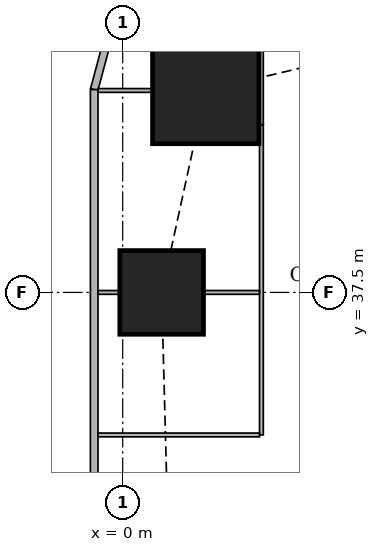
"""IFC4 building model, lengths in metres.
Left out: names, types, materials, properties, quantities, classifications, styles, units other than length and angle.
Written with IfcOpenShell. Run it as: python <this file> out.ifc"""

import sys

from ifc_helpers import new_model, si_unit, direction, frame, frame_2d, origin, origin_2d, place, context, subcontext, project, spatial, rectangle, extrude, element, fill, save


model = new_model("IFC4")
c1 = context("Model", 3, precision=1e-05, world=origin(), true_north=direction((0.0, 1.0)))
c2 = subcontext(c1, "Body", "Model", "MODEL_VIEW")
j1 = project(units=[si_unit("LENGTHUNIT", "METRE"), si_unit("PLANEANGLEUNIT", "RADIAN")], contexts=[c1])
p1 = place(None, origin())
s1 = spatial("IfcSite", under=j1, at=p1, CompositionType="ELEMENT")
p2 = place(p1, origin())
s2 = spatial("IfcBuilding", under=s1, at=p2, CompositionType="ELEMENT")
p3 = place(p2, frame((0.0, 0.0, 89.15)))
s3 = spatial("IfcBuildingStorey", under=s2, at=p3, CompositionType="ELEMENT", Elevation=89.15)
p4 = place(p3, frame((1.025, 37.5, 0.0), z_axis=(0.0, 0.0, 1.0), x_axis=(1.0, 0.0, 0.0)))
e1 = element("IfcColumn", 1, at=p4, inside=s3, PredefinedType="COLUMN", context=c2, shape_type="SweptSolid", body=[
    extrude(rectangle(XDim=2.2, YDim=2.2, at=origin_2d()), origin(), (0.0, 0.0, 1.0), 3.75),
])
p5 = place(p3, frame((2.186, 42.814, 0.0), z_axis=(0.0, 0.0, 1.0), x_axis=(1.0, 0.0, 0.0)))
e2 = element("IfcColumn", 2, at=p5, inside=s3, PredefinedType="COLUMN", context=c2, shape_type="SweptSolid", body=[
    extrude(rectangle(XDim=2.8, YDim=2.8, at=origin_2d()), origin(), (0.0, 0.0, 1.0), 3.75),
])
p6 = place(p3, frame((-0.358, 44.298, 0.0), z_axis=(0.0, 0.0, 1.0), x_axis=(-0.259168954497, -0.965832000415, 0.0)))
e3 = element("IfcWall", 3, at=p6, inside=s3, PredefinedType="SOLIDWALL", context=c2, shape_type="SweptSolid", body=[
    extrude(rectangle(XDim=1.513, YDim=0.2, at=frame_2d((0.756, 0.0))), origin(), (0.0, 0.0, 1.0), 3.5),
])
p7 = place(p3, frame((-0.75, 42.837, 0.0), z_axis=(0.0, 0.0, 1.0), x_axis=(0.0, -1.0, 0.0)))
e4 = element("IfcWall", 4, at=p7, inside=s3, PredefinedType="SOLIDWALL", context=c2, shape_type="SweptSolid", body=[
    extrude(rectangle(XDim=40.674, YDim=0.2, at=frame_2d((20.337, 0.0))), origin(), (0.0, 0.0, 1.0), 3.5),
])
p8 = place(p7, frame((1.78, 0.0, 0.9)))
e5 = element("IfcOpeningElement", 5, at=p8, cuts=e4, PredefinedType="OPENING", context=c2, shape_type="SweptSolid", body=[
    extrude(rectangle(XDim=1.8, YDim=1.5, at=frame_2d((0.9, 0.75))), frame((0.0, 0.11, 0.0), z_axis=(0.0, -1.0, 0.0), x_axis=(1.0, 0.0, 0.0)), (0.0, 0.0, 1.0), 0.22),
])
p9 = place(p7, frame((6.312, 0.0, 0.9)))
e6 = element("IfcOpeningElement", 6, at=p9, cuts=e4, PredefinedType="OPENING", context=c2, shape_type="SweptSolid", body=[
    extrude(rectangle(XDim=1.8, YDim=1.5, at=frame_2d((0.9, 0.75))), frame((0.0, 0.11, 0.0), z_axis=(0.0, -1.0, 0.0), x_axis=(1.0, 0.0, 0.0)), (0.0, 0.0, 1.0), 0.22),
])
p10 = place(p7, frame((10.062, 0.0, 0.9)))
e7 = element("IfcOpeningElement", 7, at=p10, cuts=e4, PredefinedType="OPENING", context=c2, shape_type="SweptSolid", body=[
    extrude(rectangle(XDim=1.8, YDim=1.5, at=frame_2d((0.9, 0.75))), frame((0.0, 0.11, 0.0), z_axis=(0.0, -1.0, 0.0), x_axis=(1.0, 0.0, 0.0)), (0.0, 0.0, 1.0), 0.22),
])
p11 = place(p7, frame((13.812, 0.0, 0.9)))
e8 = element("IfcOpeningElement", 8, at=p11, cuts=e4, PredefinedType="OPENING", context=c2, shape_type="SweptSolid", body=[
    extrude(rectangle(XDim=1.8, YDim=1.5, at=frame_2d((0.9, 0.75))), frame((0.0, 0.11, 0.0), z_axis=(0.0, -1.0, 0.0), x_axis=(1.0, 0.0, 0.0)), (0.0, 0.0, 1.0), 0.22),
])
p12 = place(p7, frame((17.562, 0.0, 0.9)))
e9 = element("IfcOpeningElement", 9, at=p12, cuts=e4, PredefinedType="OPENING", context=c2, shape_type="SweptSolid", body=[
    extrude(rectangle(XDim=1.8, YDim=1.5, at=frame_2d((0.9, 0.75))), frame((0.0, 0.11, 0.0), z_axis=(0.0, -1.0, 0.0), x_axis=(1.0, 0.0, 0.0)), (0.0, 0.0, 1.0), 0.22),
])
p13 = place(p7, frame((21.312, 0.0, 0.9)))
e10 = element("IfcOpeningElement", 10, at=p13, cuts=e4, PredefinedType="OPENING", context=c2, shape_type="SweptSolid", body=[
    extrude(rectangle(XDim=1.8, YDim=1.5, at=frame_2d((0.9, 0.75))), frame((0.0, 0.11, 0.0), z_axis=(0.0, -1.0, 0.0), x_axis=(1.0, 0.0, 0.0)), (0.0, 0.0, 1.0), 0.22),
])
p14 = place(p7, frame((25.062, 0.0, 0.9)))
e11 = element("IfcOpeningElement", 11, at=p14, cuts=e4, PredefinedType="OPENING", context=c2, shape_type="SweptSolid", body=[
    extrude(rectangle(XDim=1.8, YDim=1.5, at=frame_2d((0.9, 0.75))), frame((0.0, 0.11, 0.0), z_axis=(0.0, -1.0, 0.0), x_axis=(1.0, 0.0, 0.0)), (0.0, 0.0, 1.0), 0.22),
])
p15 = place(p7, frame((28.812, 0.0, 0.9)))
e12 = element("IfcOpeningElement", 12, at=p15, cuts=e4, PredefinedType="OPENING", context=c2, shape_type="SweptSolid", body=[
    extrude(rectangle(XDim=1.8, YDim=1.5, at=frame_2d((0.9, 0.75))), frame((0.0, 0.11, 0.0), z_axis=(0.0, -1.0, 0.0), x_axis=(1.0, 0.0, 0.0)), (0.0, 0.0, 1.0), 0.22),
])
p16 = place(p7, frame((32.562, 0.0, 0.9)))
e13 = element("IfcOpeningElement", 13, at=p16, cuts=e4, PredefinedType="OPENING", context=c2, shape_type="SweptSolid", body=[
    extrude(rectangle(XDim=1.8, YDim=1.5, at=frame_2d((0.9, 0.75))), frame((0.0, 0.11, 0.0), z_axis=(0.0, -1.0, 0.0), x_axis=(1.0, 0.0, 0.0)), (0.0, 0.0, 1.0), 0.22),
])
p17 = place(p7, frame((37.094, 0.0, 0.9)))
e14 = element("IfcOpeningElement", 14, at=p17, cuts=e4, PredefinedType="OPENING", context=c2, shape_type="SweptSolid", body=[
    extrude(rectangle(XDim=1.8, YDim=1.5, at=frame_2d((0.9, 0.75))), frame((0.0, 0.11, 0.0), z_axis=(0.0, -1.0, 0.0), x_axis=(1.0, 0.0, 0.0)), (0.0, 0.0, 1.0), 0.22),
])
p18 = place(p3, frame((3.65, 33.75, 0.0), z_axis=(0.0, 0.0, 1.0), x_axis=(0.0, 1.0, 0.0)))
e15 = element("IfcWall", 15, at=p18, inside=s3, PredefinedType="PARTITIONING", context=c2, shape_type="SweptSolid", body=[
    extrude(rectangle(XDim=8.165, YDim=0.1, at=frame_2d((4.083, 0.0))), origin(), (0.0, 0.0, 1.0), 3.5),
])
p19 = place(p18, frame((0.2, 0.0, 0.0)))
e16 = element("IfcOpeningElement", 16, at=p19, cuts=e15, PredefinedType="OPENING", context=c2, shape_type="SweptSolid", body=[
    extrude(rectangle(XDim=0.9, YDim=2.1, at=frame_2d((0.45, 1.05))), frame((0.0, 0.06, 0.0), z_axis=(0.0, -1.0, 0.0), x_axis=(1.0, 0.0, 0.0)), (0.0, 0.0, 1.0), 0.12),
])
p20 = place(p18, frame((3.95, 0.0, 0.0)))
e17 = element("IfcOpeningElement", 17, at=p20, cuts=e15, PredefinedType="OPENING", context=c2, shape_type="SweptSolid", body=[
    extrude(rectangle(XDim=0.9, YDim=2.1, at=frame_2d((0.45, 1.05))), frame((0.0, 0.06, 0.0), z_axis=(0.0, -1.0, 0.0), x_axis=(1.0, 0.0, 0.0)), (0.0, 0.0, 1.0), 0.12),
])
p21 = place(p3, frame((3.65, 41.915, 0.0), z_axis=(0.0, 0.0, 1.0), x_axis=(0.0, 1.0, 0.0)))
e18 = element("IfcWall", 18, at=p21, inside=s3, PredefinedType="PARTITIONING", context=c2, shape_type="SweptSolid", body=[
    extrude(rectangle(XDim=2.49, YDim=0.1, at=frame_2d((1.245, 0.0))), origin(), (0.0, 0.0, 1.0), 2.05),
])
p22 = place(p3, frame((-0.65, 33.75, 0.0), z_axis=(0.0, 0.0, 1.0), x_axis=(1.0, 0.0, 0.0)))
e19 = element("IfcWall", 19, at=p22, inside=s3, PredefinedType="PARTITIONING", context=c2, shape_type="SweptSolid", body=[
    extrude(rectangle(XDim=4.25, YDim=0.1, at=frame_2d((2.125, 0.0))), origin(), (0.0, 0.0, 1.0), 2.2),
])
p23 = place(p3, frame((-0.65, 37.5, 0.0), z_axis=(0.0, 0.0, 1.0), x_axis=(1.0, 0.0, 0.0)))
e20 = element("IfcWall", 20, at=p23, inside=s3, PredefinedType="PARTITIONING", context=c2, shape_type="SweptSolid", body=[
    extrude(rectangle(XDim=0.574, YDim=0.1, at=frame_2d((0.287, 0.0))), origin(), (0.0, 0.0, 1.0), 2.05),
])
p24 = place(p3, frame((2.126, 37.5, 0.0), z_axis=(0.0, 0.0, 1.0), x_axis=(1.0, 0.0, 0.0)))
e21 = element("IfcWall", 21, at=p24, inside=s3, PredefinedType="PARTITIONING", context=c2, shape_type="SweptSolid", body=[
    extrude(rectangle(XDim=1.474, YDim=0.1, at=frame_2d((0.737, 0.0))), origin(), (0.0, 0.0, 1.0), 2.05),
])
p25 = place(p3, frame((-0.65, 42.814, 0.0), z_axis=(0.0, 0.0, 1.0), x_axis=(1.0, 0.0, 0.0)))
e22 = element("IfcWall", 22, at=p25, inside=s3, PredefinedType="PARTITIONING", context=c2, shape_type="SweptSolid", body=[
    extrude(rectangle(XDim=1.435, YDim=0.1, at=frame_2d((0.717, 0.0))), origin(), (0.0, 0.0, 1.0), 3.5),
])
p26 = place(p8, origin())
e23 = element("IfcWindow", 23, at=p26, inside=s3, PartitioningType="SINGLE_PANEL", PredefinedType="WINDOW", context=c2, shape_type="SweptSolid", body=[
    extrude(rectangle(XDim=1.8, YDim=1.5, at=frame_2d((0.9, 0.75))), frame((0.0, 0.03, 0.0), z_axis=(0.0, -1.0, 0.0), x_axis=(1.0, 0.0, 0.0)), (0.0, 0.0, 1.0), 0.06),
])
fill(e5, e23)
p27 = place(p9, origin())
e24 = element("IfcWindow", 24, at=p27, inside=s3, PartitioningType="SINGLE_PANEL", PredefinedType="WINDOW", context=c2, shape_type="SweptSolid", body=[
    extrude(rectangle(XDim=1.8, YDim=1.5, at=frame_2d((0.9, 0.75))), frame((0.0, 0.03, 0.0), z_axis=(0.0, -1.0, 0.0), x_axis=(1.0, 0.0, 0.0)), (0.0, 0.0, 1.0), 0.06),
])
fill(e6, e24)
p28 = place(p10, origin())
e25 = element("IfcWindow", 25, at=p28, inside=s3, PartitioningType="SINGLE_PANEL", PredefinedType="WINDOW", context=c2, shape_type="SweptSolid", body=[
    extrude(rectangle(XDim=1.8, YDim=1.5, at=frame_2d((0.9, 0.75))), frame((0.0, 0.03, 0.0), z_axis=(0.0, -1.0, 0.0), x_axis=(1.0, 0.0, 0.0)), (0.0, 0.0, 1.0), 0.06),
])
fill(e7, e25)
p29 = place(p19, origin())
e26 = element("IfcDoor", 26, at=p29, inside=s3, OperationType="SINGLE_SWING_LEFT", PredefinedType="DOOR", context=c2, shape_type="SweptSolid", body=[
    extrude(rectangle(XDim=0.9, YDim=2.1, at=frame_2d((0.45, 1.05))), frame((0.0, 0.025, 0.0), z_axis=(0.0, -1.0, 0.0), x_axis=(1.0, 0.0, 0.0)), (0.0, 0.0, 1.0), 0.05),
])
fill(e16, e26)
p30 = place(p20, origin())
e27 = element("IfcDoor", 27, at=p30, inside=s3, OperationType="SINGLE_SWING_LEFT", PredefinedType="DOOR", context=c2, shape_type="SweptSolid", body=[
    extrude(rectangle(XDim=0.9, YDim=2.1, at=frame_2d((0.45, 1.05))), frame((0.0, 0.025, 0.0), z_axis=(0.0, -1.0, 0.0), x_axis=(1.0, 0.0, 0.0)), (0.0, 0.0, 1.0), 0.05),
])
fill(e17, e27)
save(model, sys.argv[1])
